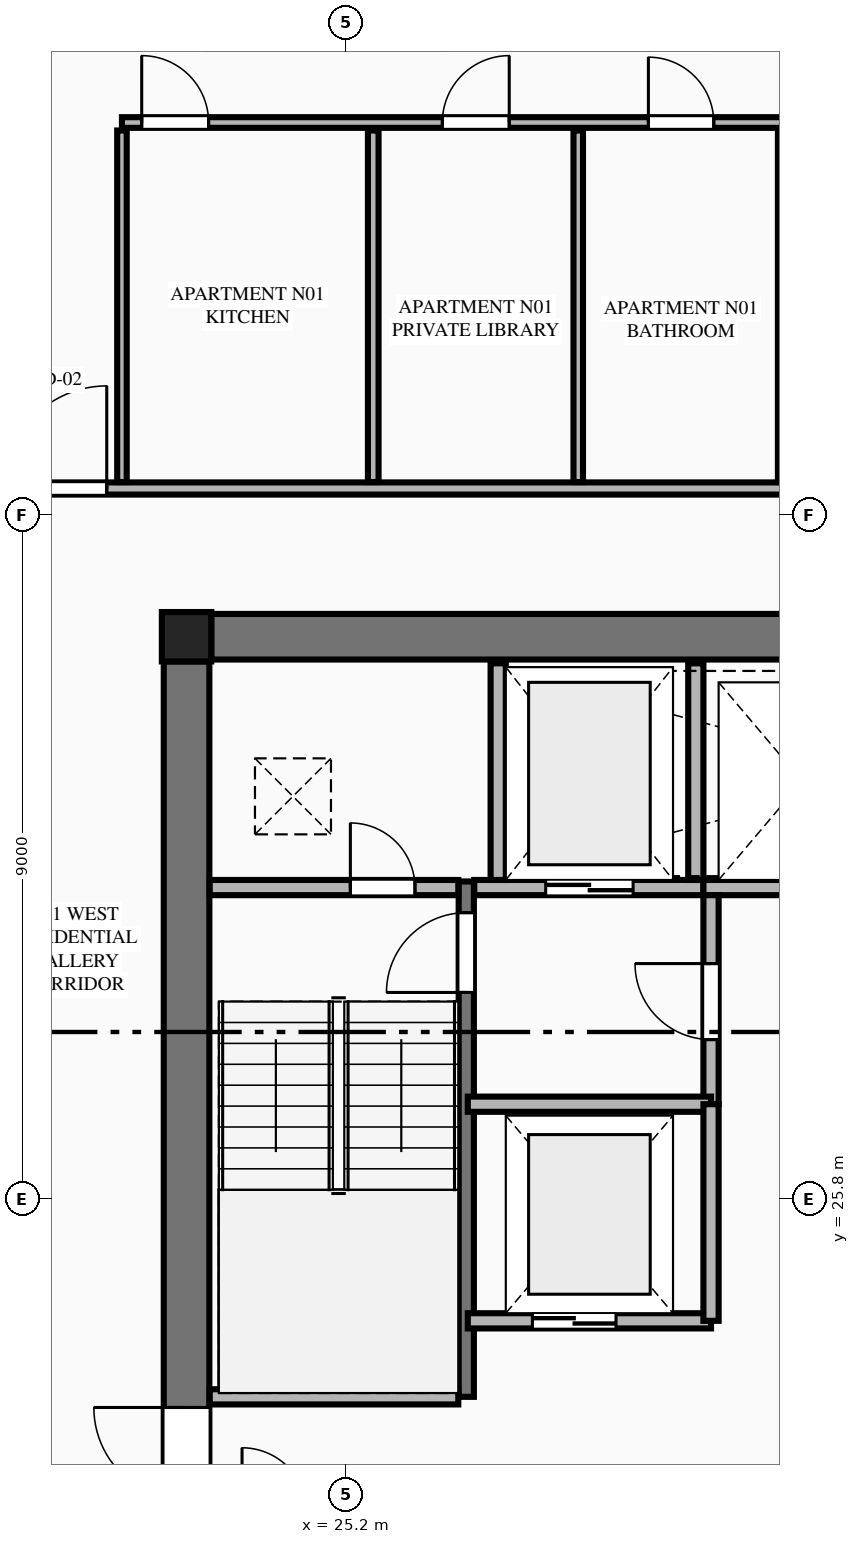
"""IFC4 building model, lengths in metres.
Left out: names, types, materials, properties, quantities, classifications, styles, units other than length and angle.
Written with IfcOpenShell. Run it as: python <this file> out.ifc"""

import sys

from ifc_helpers import new_model, si_unit, direction, frame, frame_2d, origin, origin_2d, place, context, subcontext, project, spatial, rectangle, extrude, element, fill, save


model = new_model("IFC4")
c1 = context("Model", 3, precision=1e-05, world=origin(), true_north=direction((0.0, 1.0)))
c2 = subcontext(c1, "Body", "Model", "MODEL_VIEW")
j1 = project(units=[si_unit("LENGTHUNIT", "METRE"), si_unit("PLANEANGLEUNIT", "RADIAN")], contexts=[c1])
p1 = place(None, origin())
s1 = spatial("IfcSite", under=j1, at=p1, CompositionType="ELEMENT")
p2 = place(p1, origin())
s2 = spatial("IfcBuilding", under=s1, at=p2, CompositionType="ELEMENT")
p3 = place(p2, frame((0.0, 0.0, 157.05)))
s3 = spatial("IfcBuildingStorey", under=s2, at=p3, CompositionType="ELEMENT", Elevation=157.05)
p4 = place(p3, frame((23.1, 33.2, 0.0), z_axis=(0.0, 0.0, 1.0), x_axis=(1.0, 0.0, 0.0)))
e1 = element("IfcColumn", 1, at=p4, inside=s3, PredefinedType="COLUMN", context=c2, shape_type="SweptSolid", body=[
    extrude(rectangle(XDim=0.65, YDim=0.65, at=origin_2d()), origin(), (0.0, 0.0, 1.0), 3.55),
])
p5 = place(p3, frame((23.425, 33.2, 0.0), z_axis=(0.0, 0.0, 1.0), x_axis=(1.0, 0.0, 0.0)))
e2 = element("IfcWall", 2, at=p5, inside=s3, PredefinedType="SHEAR", context=c2, shape_type="SweptSolid", body=[
    extrude(rectangle(XDim=17.95, YDim=0.6, at=frame_2d((8.975, 0.0))), origin(), (0.0, 0.0, 1.0), 3.34),
])
p6 = place(p3, frame((23.1, 18.925, 0.0), z_axis=(0.0, 0.0, 1.0), x_axis=(0.0, 1.0, 0.0)))
e3 = element("IfcWall", 3, at=p6, inside=s3, PredefinedType="SHEAR", context=c2, shape_type="SweptSolid", body=[
    extrude(rectangle(XDim=13.95, YDim=0.6, at=frame_2d((6.975, 0.0))), origin(), (0.0, 0.0, 1.0), 3.34),
])
p7 = place(p6, frame((2.915, 0.0, 0.0)))
e4 = element("IfcOpeningElement", 4, at=p7, cuts=e3, PredefinedType="OPENING", context=c2, shape_type="SweptSolid", body=[
    extrude(rectangle(XDim=1.22, YDim=2.25, at=frame_2d((0.61, 1.125))), frame((0.0, 0.31, 0.0), z_axis=(0.0, -1.0, 0.0), x_axis=(1.0, 0.0, 0.0)), (0.0, 0.0, 1.0), 0.62),
])
p8 = place(p3, frame((26.78, 23.2, 0.0), z_axis=(0.0, 0.0, 1.0), x_axis=(0.0, 1.0, 0.0)))
e5 = element("IfcWall", 5, at=p8, inside=s3, PredefinedType="SHEAR", context=c2, shape_type="SweptSolid", body=[
    extrude(rectangle(XDim=6.78, YDim=0.2, at=frame_2d((3.39, 0.0))), origin(), (0.0, 0.0, 1.0), 3.55),
])
p9 = place(p8, frame((5.32, 0.0, 0.0)))
e6 = element("IfcOpeningElement", 6, at=p9, cuts=e5, PredefinedType="OPENING", context=c2, shape_type="SweptSolid", body=[
    extrude(rectangle(XDim=1.05, YDim=2.15, at=frame_2d((0.525, 1.075))), frame((0.0, 0.11, 0.0), z_axis=(0.0, -1.0, 0.0), x_axis=(1.0, 0.0, 0.0)), (0.0, 0.0, 1.0), 0.22),
])
p10 = place(p3, frame((23.405, 23.2, 0.0), z_axis=(0.0, 0.0, 1.0), x_axis=(1.0, 0.0, 0.0)))
e7 = element("IfcWall", 7, at=p10, inside=s3, PredefinedType="PLUMBINGWALL", context=c2, shape_type="SweptSolid", body=[
    extrude(rectangle(XDim=3.27, YDim=0.2, at=frame_2d((1.635, 0.0))), origin(), (0.0, 0.0, 1.0), 3.34),
])
p11 = place(p3, frame((23.405, 29.9, 0.0), z_axis=(0.0, 0.0, 1.0), x_axis=(1.0, 0.0, 0.0)))
e8 = element("IfcWall", 8, at=p11, inside=s3, PredefinedType="PLUMBINGWALL", context=c2, shape_type="SweptSolid", body=[
    extrude(rectangle(XDim=3.27, YDim=0.2, at=frame_2d((1.635, 0.0))), origin(), (0.0, 0.0, 1.0), 3.34),
])
p12 = place(p11, frame((1.85, 0.0, 0.0)))
e9 = element("IfcOpeningElement", 9, at=p12, cuts=e8, PredefinedType="OPENING", context=c2, shape_type="SweptSolid", body=[
    extrude(rectangle(XDim=0.85, YDim=2.05, at=frame_2d((0.425, 1.025))), frame((0.0, 0.11, 0.0), z_axis=(0.0, -1.0, 0.0), x_axis=(1.0, 0.0, 0.0)), (0.0, 0.0, 1.0), 0.22),
])
p13 = place(p3, frame((26.885, 29.9, 0.0), z_axis=(0.0, 0.0, 1.0), x_axis=(1.0, 0.0, 0.0)))
e10 = element("IfcWall", 10, at=p13, inside=s3, PredefinedType="PLUMBINGWALL", context=c2, shape_type="SweptSolid", body=[
    extrude(rectangle(XDim=3.015, YDim=0.2, at=frame_2d((1.507, 0.0))), origin(), (0.0, 0.0, 1.0), 3.34),
])
p14 = place(p13, frame((0.94, 0.0, 0.0)))
e11 = element("IfcOpeningElement", 11, at=p14, cuts=e10, PredefinedType="OPENING", context=c2, shape_type="SweptSolid", body=[
    extrude(rectangle(XDim=1.15, YDim=2.2, at=frame_2d((0.575, 1.1))), frame((0.0, 0.11, 0.0), z_axis=(0.0, -1.0, 0.0), x_axis=(1.0, 0.0, 0.0)), (0.0, 0.0, 1.0), 0.22),
])
p15 = place(p3, frame((29.9, 29.9, 0.0), z_axis=(0.0, 0.0, 1.0), x_axis=(1.0, 0.0, 0.0)))
e12 = element("IfcWall", 12, at=p15, inside=s3, PredefinedType="PLUMBINGWALL", context=c2, shape_type="SweptSolid", body=[
    extrude(rectangle(XDim=5.0, YDim=0.2, at=frame_2d((2.5, 0.0))), origin(), (0.0, 0.0, 1.0), 3.34),
])
for number, where, z_axis, x_axis in (
    (13, (27.2, 30.0, 0.0), (0.0, 0.0, 1.0), (0.0, 1.0, 0.0)),
    (14, (29.8, 30.0, 0.0), (0.0, 0.0, 1.0), (0.0, 1.0, 0.0)),
):
    element("IfcWall", number, at=place(p3, frame(where, z_axis=z_axis, x_axis=x_axis)), inside=s3, PredefinedType="PLUMBINGWALL", context=c2, shape_type="SweptSolid", body=[
        extrude(rectangle(XDim=2.85, YDim=0.2, at=frame_2d((1.425, 0.0))), origin(), (0.0, 0.0, 1.0), 3.34),
    ])
p16 = place(p3, frame((30.0, 27.05, 0.0), z_axis=(0.0, 0.0, 1.0), x_axis=(0.0, 1.0, 0.0)))
e15 = element("IfcWall", 15, at=p16, inside=s3, PredefinedType="PLUMBINGWALL", context=c2, shape_type="SweptSolid", body=[
    extrude(rectangle(XDim=2.75, YDim=0.2, at=frame_2d((1.375, 0.0))), origin(), (0.0, 0.0, 1.0), 3.34),
])
p17 = place(p16, frame((0.85, 0.0, 0.0)))
e16 = element("IfcOpeningElement", 16, at=p17, cuts=e15, PredefinedType="OPENING", context=c2, shape_type="SweptSolid", body=[
    extrude(rectangle(XDim=1.0, YDim=2.15, at=frame_2d((0.5, 1.075))), frame((0.0, 0.11, 0.0), z_axis=(0.0, -1.0, 0.0), x_axis=(1.0, 0.0, 0.0)), (0.0, 0.0, 1.0), 0.22),
])
p18 = place(p3, frame((26.8, 27.05, 0.0), z_axis=(0.0, 0.0, 1.0), x_axis=(1.0, 0.0, 0.0)))
e17 = element("IfcWall", 17, at=p18, inside=s3, PredefinedType="PLUMBINGWALL", context=c2, shape_type="SweptSolid", body=[
    extrude(rectangle(XDim=3.2, YDim=0.2, at=frame_2d((1.6, 0.0))), origin(), (0.0, 0.0, 1.0), 3.34),
])
p19 = place(p3, frame((26.8, 24.2, 0.0), z_axis=(0.0, 0.0, 1.0), x_axis=(1.0, 0.0, 0.0)))
e18 = element("IfcWall", 18, at=p19, inside=s3, PredefinedType="PLUMBINGWALL", context=c2, shape_type="SweptSolid", body=[
    extrude(rectangle(XDim=3.2, YDim=0.2, at=frame_2d((1.6, 0.0))), origin(), (0.0, 0.0, 1.0), 3.34),
])
p20 = place(p19, frame((0.85, 0.0, 0.0)))
e19 = element("IfcOpeningElement", 19, at=p20, cuts=e18, PredefinedType="OPENING", context=c2, shape_type="SweptSolid", body=[
    extrude(rectangle(XDim=1.1, YDim=2.2, at=frame_2d((0.55, 1.1))), frame((0.0, 0.11, 0.0), z_axis=(0.0, -1.0, 0.0), x_axis=(1.0, 0.0, 0.0)), (0.0, 0.0, 1.0), 0.22),
])
p21 = place(p3, frame((30.0, 24.2, 0.0), z_axis=(0.0, 0.0, 1.0), x_axis=(0.0, 1.0, 0.0)))
e20 = element("IfcWall", 20, at=p21, inside=s3, PredefinedType="PLUMBINGWALL", context=c2, shape_type="SweptSolid", body=[
    extrude(rectangle(XDim=2.85, YDim=0.2, at=frame_2d((1.425, 0.0))), origin(), (0.0, 0.0, 1.0), 3.34),
])
p22 = place(p3, frame((20.295, 35.15, 0.0), z_axis=(0.0, 0.0, 1.0), x_axis=(1.0, 0.0, 0.0)))
e21 = element("IfcWall", 21, at=p22, inside=s3, PredefinedType="PARTITIONING", context=c2, shape_type="SweptSolid", body=[
    extrude(rectangle(XDim=24.21, YDim=0.16, at=frame_2d((12.105, 0.0))), origin(), (0.0, 0.0, 1.0), 3.34),
])
p23 = place(p22, frame((0.405, 0.0, 0.0)))
e22 = element("IfcOpeningElement", 22, at=p23, cuts=e21, PredefinedType="OPENING", context=c2, shape_type="SweptSolid", body=[
    extrude(rectangle(XDim=1.35, YDim=2.35, at=frame_2d((0.675, 1.175))), frame((0.0, 0.09, 0.0), z_axis=(0.0, -1.0, 0.0), x_axis=(1.0, 0.0, 0.0)), (0.0, 0.0, 1.0), 0.18),
])
p24 = place(p3, frame((22.25, 35.235, 0.0), z_axis=(0.0, 0.0, 1.0), x_axis=(0.0, 1.0, 0.0)))
e23 = element("IfcWall", 23, at=p24, inside=s3, PredefinedType="PARTITIONING", context=c2, shape_type="SweptSolid", body=[
    extrude(rectangle(XDim=4.625, YDim=0.125, at=frame_2d((2.312, 0.0))), origin(), (0.0, 0.0, 1.0), 2.722),
])
p25 = place(p3, frame((22.25, 39.965, 0.0), z_axis=(0.0, 0.0, 1.0), x_axis=(1.0, 0.0, 0.0)))
e24 = element("IfcWall", 24, at=p25, inside=s3, PredefinedType="PLUMBINGWALL", context=c2, shape_type="SweptSolid", body=[
    extrude(rectangle(XDim=8.7, YDim=0.14, at=frame_2d((4.35, 0.0))), origin(), (0.0, 0.0, 1.0), 3.34),
])
p26 = place(p25, frame((6.926, 0.0, 0.0)))
e25 = element("IfcOpeningElement", 25, at=p26, cuts=e24, PredefinedType="OPENING", context=c2, shape_type="SweptSolid", body=[
    extrude(rectangle(XDim=0.86, YDim=2.1, at=frame_2d((0.43, 1.05))), frame((0.0, 0.08, 0.0), z_axis=(0.0, -1.0, 0.0), x_axis=(1.0, 0.0, 0.0)), (0.0, 0.0, 1.0), 0.16),
])
p27 = place(p25, frame((0.26, 0.0, 0.0)))
e26 = element("IfcOpeningElement", 26, at=p27, cuts=e24, PredefinedType="OPENING", context=c2, shape_type="SweptSolid", body=[
    extrude(rectangle(XDim=0.88, YDim=2.15, at=frame_2d((0.44, 1.075))), frame((0.0, 0.08, 0.0), z_axis=(0.0, -1.0, 0.0), x_axis=(1.0, 0.0, 0.0)), (0.0, 0.0, 1.0), 0.16),
])
p28 = place(p25, frame((4.215, 0.0, 0.0)))
e27 = element("IfcOpeningElement", 27, at=p28, cuts=e24, PredefinedType="OPENING", context=c2, shape_type="SweptSolid", body=[
    extrude(rectangle(XDim=0.88, YDim=2.15, at=frame_2d((0.44, 1.075))), frame((0.0, 0.08, 0.0), z_axis=(0.0, -1.0, 0.0), x_axis=(1.0, 0.0, 0.0)), (0.0, 0.0, 1.0), 0.16),
])
p29 = place(p3, frame((25.556, 35.235, 0.0), z_axis=(0.0, 0.0, 1.0), x_axis=(0.0, 1.0, 0.0)))
e28 = element("IfcWall", 28, at=p29, inside=s3, PredefinedType="PLUMBINGWALL", context=c2, shape_type="SweptSolid", body=[
    extrude(rectangle(XDim=4.625, YDim=0.14, at=frame_2d((2.312, 0.0))), origin(), (0.0, 0.0, 1.0), 3.34),
])
p30 = place(p3, frame((28.253, 35.235, 0.0), z_axis=(0.0, 0.0, 1.0), x_axis=(0.0, 1.0, 0.0)))
e29 = element("IfcWall", 29, at=p30, inside=s3, PredefinedType="PARTITIONING", context=c2, shape_type="SweptSolid", body=[
    extrude(rectangle(XDim=4.625, YDim=0.125, at=frame_2d((2.312, 0.0))), origin(), (0.0, 0.0, 1.0), 3.34),
])
p31 = place(p3, frame((30.95, 35.235, 0.0), z_axis=(0.0, 0.0, 1.0), x_axis=(0.0, 1.0, 0.0)))
e30 = element("IfcWall", 30, at=p31, inside=s3, PredefinedType="PLUMBINGWALL", context=c2, shape_type="SweptSolid", body=[
    extrude(rectangle(XDim=4.625, YDim=0.14, at=frame_2d((2.312, 0.0))), origin(), (0.0, 0.0, 1.0), 3.34),
])
p32 = place(p7, origin())
e31 = element("IfcDoor", 31, at=p32, inside=s3, OperationType="SINGLE_SWING_RIGHT", PredefinedType="DOOR", context=c2, shape_type="SweptSolid", body=[
    extrude(rectangle(XDim=1.22, YDim=2.25, at=frame_2d((0.61, 1.125))), frame((0.0, 0.025, 0.0), z_axis=(0.0, -1.0, 0.0), x_axis=(1.0, 0.0, 0.0)), (0.0, 0.0, 1.0), 0.05),
])
fill(e4, e31)
p33 = place(p9, origin())
e32 = element("IfcDoor", 32, at=p33, inside=s3, OperationType="SINGLE_SWING_LEFT", PredefinedType="DOOR", context=c2, shape_type="SweptSolid", body=[
    extrude(rectangle(XDim=1.05, YDim=2.15, at=frame_2d((0.525, 1.075))), frame((0.0, 0.025, 0.0), z_axis=(0.0, -1.0, 0.0), x_axis=(1.0, 0.0, 0.0)), (0.0, 0.0, 1.0), 0.05),
])
fill(e6, e32)
p34 = place(p12, origin())
e33 = element("IfcDoor", 33, at=p34, inside=s3, OperationType="SINGLE_SWING_LEFT", PredefinedType="DOOR", context=c2, shape_type="SweptSolid", body=[
    extrude(rectangle(XDim=0.85, YDim=2.05, at=frame_2d((0.425, 1.025))), frame((0.0, 0.025, 0.0), z_axis=(0.0, -1.0, 0.0), x_axis=(1.0, 0.0, 0.0)), (0.0, 0.0, 1.0), 0.05),
])
fill(e9, e33)
p35 = place(p14, origin())
e34 = element("IfcDoor", 34, at=p35, inside=s3, OperationType="DOUBLE_DOOR_SLIDING", PredefinedType="DOOR", context=c2, shape_type="SweptSolid", body=[
    extrude(rectangle(XDim=1.15, YDim=2.2, at=frame_2d((0.575, 1.1))), frame((0.0, 0.025, 0.0), z_axis=(0.0, -1.0, 0.0), x_axis=(1.0, 0.0, 0.0)), (0.0, 0.0, 1.0), 0.05),
])
fill(e11, e34)
p36 = place(p17, origin())
e35 = element("IfcDoor", 35, at=p36, inside=s3, OperationType="SINGLE_SWING_RIGHT", PredefinedType="DOOR", context=c2, shape_type="SweptSolid", body=[
    extrude(rectangle(XDim=1.0, YDim=2.15, at=frame_2d((0.5, 1.075))), frame((0.0, 0.025, 0.0), z_axis=(0.0, -1.0, 0.0), x_axis=(1.0, 0.0, 0.0)), (0.0, 0.0, 1.0), 0.05),
])
fill(e16, e35)
p37 = place(p20, origin())
e36 = element("IfcDoor", 36, at=p37, inside=s3, OperationType="DOUBLE_DOOR_SLIDING", PredefinedType="DOOR", context=c2, shape_type="SweptSolid", body=[
    extrude(rectangle(XDim=1.1, YDim=2.2, at=frame_2d((0.55, 1.1))), frame((0.0, 0.025, 0.0), z_axis=(0.0, -1.0, 0.0), x_axis=(1.0, 0.0, 0.0)), (0.0, 0.0, 1.0), 0.05),
])
fill(e19, e36)
p38 = place(p26, origin())
e37 = element("IfcDoor", 37, at=p38, inside=s3, OperationType="SINGLE_SWING_LEFT", PredefinedType="DOOR", context=c2, shape_type="SweptSolid", body=[
    extrude(rectangle(XDim=0.86, YDim=2.1, at=frame_2d((0.43, 1.05))), frame((0.0, 0.025, 0.0), z_axis=(0.0, -1.0, 0.0), x_axis=(1.0, 0.0, 0.0)), (0.0, 0.0, 1.0), 0.05),
])
fill(e25, e37)
p39 = place(p23, origin())
e38 = element("IfcDoor", 38, at=p39, inside=s3, OperationType="SINGLE_SWING_RIGHT", PredefinedType="DOOR", context=c2, shape_type="SweptSolid", body=[
    extrude(rectangle(XDim=1.35, YDim=2.35, at=frame_2d((0.675, 1.175))), frame((0.0, 0.025, 0.0), z_axis=(0.0, -1.0, 0.0), x_axis=(1.0, 0.0, 0.0)), (0.0, 0.0, 1.0), 0.05),
])
fill(e22, e38)
p40 = place(p27, origin())
e39 = element("IfcDoor", 39, at=p40, inside=s3, OperationType="SINGLE_SWING_LEFT", PredefinedType="DOOR", context=c2, shape_type="SweptSolid", body=[
    extrude(rectangle(XDim=0.88, YDim=2.15, at=frame_2d((0.44, 1.075))), frame((0.0, 0.025, 0.0), z_axis=(0.0, -1.0, 0.0), x_axis=(1.0, 0.0, 0.0)), (0.0, 0.0, 1.0), 0.05),
])
fill(e26, e39)
p41 = place(p28, origin())
e40 = element("IfcDoor", 40, at=p41, inside=s3, OperationType="SINGLE_SWING_RIGHT", PredefinedType="DOOR", context=c2, shape_type="SweptSolid", body=[
    extrude(rectangle(XDim=0.88, YDim=2.15, at=frame_2d((0.44, 1.075))), frame((0.0, 0.025, 0.0), z_axis=(0.0, -1.0, 0.0), x_axis=(1.0, 0.0, 0.0)), (0.0, 0.0, 1.0), 0.05),
])
fill(e27, e40)
save(model, sys.argv[1])
